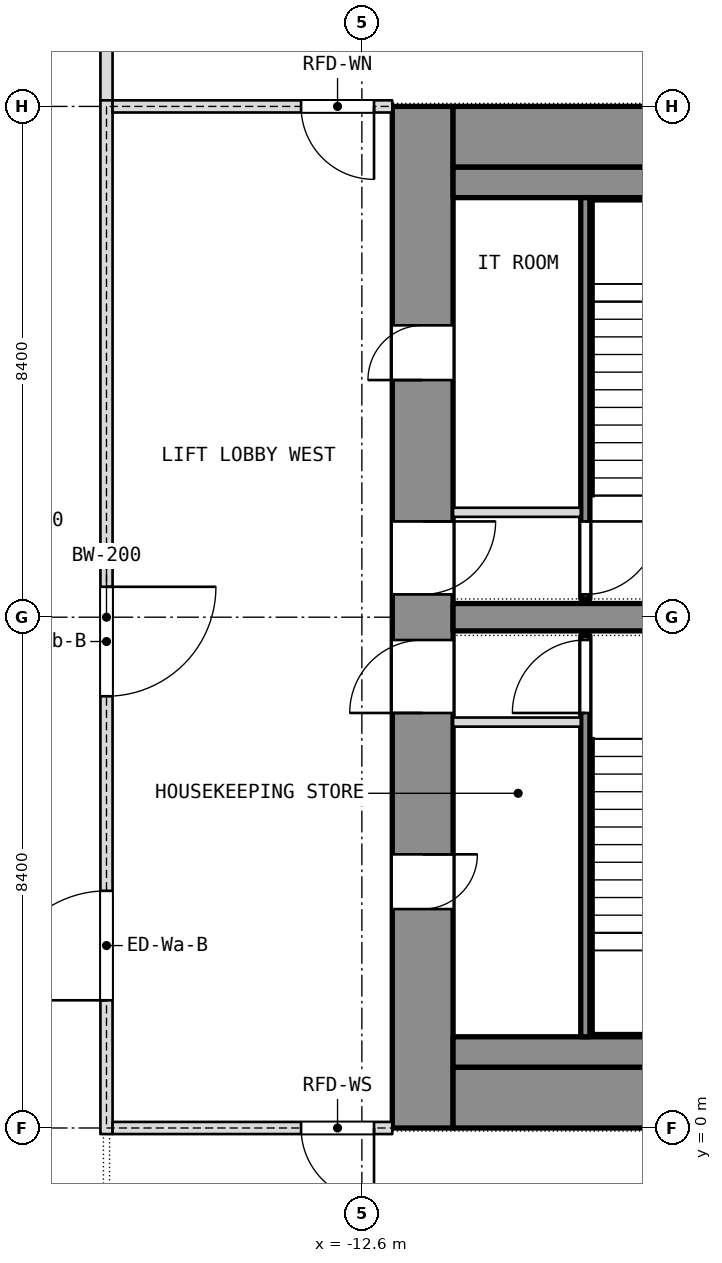
"""IFC4 building model, lengths in metres.
Left out: names, types, materials, properties, quantities, classifications, styles, units other than length and angle.
Written with IfcOpenShell. Run it as: python <this file> out.ifc"""

import sys

from ifc_helpers import new_model, si_unit, direction, frame, frame_2d, origin, place, context, subcontext, project, spatial, rectangle, extrude, element, fill, save


model = new_model("IFC4")
c1 = context("Model", 3, precision=1e-05, world=origin(), true_north=direction((0.0, 1.0)))
c2 = subcontext(c1, "Body", "Model", "MODEL_VIEW")
j1 = project(units=[si_unit("LENGTHUNIT", "METRE"), si_unit("PLANEANGLEUNIT", "RADIAN")], contexts=[c1])
p1 = place(None, origin())
s1 = spatial("IfcSite", under=j1, at=p1, CompositionType="ELEMENT")
p2 = place(p1, origin())
s2 = spatial("IfcBuilding", under=s1, at=p2, CompositionType="ELEMENT")
p3 = place(p2, frame((0.0, 0.0, 133.7)))
s3 = spatial("IfcBuildingStorey", under=s2, at=p3, CompositionType="ELEMENT", Elevation=133.7)
p4 = place(p3, frame((-11.6, 0.0, 0.0), z_axis=(0.0, 0.0, 1.0), x_axis=(0.0, 1.0, 0.0)))
e1 = element("IfcWall", 1, at=p4, inside=s3, PredefinedType="SHEAR", context=c2, shape_type="SweptSolid", body=[
    extrude(rectangle(XDim=16.8, YDim=1.0, at=frame_2d((8.4, 0.0))), origin(), (0.0, 0.0, 1.0), 3.6),
])
p5 = place(p4, frame((3.6, 0.0, 0.0)))
e2 = element("IfcOpeningElement", 2, at=p5, cuts=e1, PredefinedType="OPENING", context=c2, shape_type="SweptSolid", body=[
    extrude(rectangle(XDim=0.9, YDim=2.1, at=frame_2d((0.45, 1.05))), frame((0.0, 0.5, 0.0), z_axis=(0.0, -1.0, 0.0), x_axis=(1.0, 0.0, 0.0)), (0.0, 0.0, 1.0), 1.0),
])
p6 = place(p4, frame((6.825, 0.0, 0.0)))
e3 = element("IfcOpeningElement", 3, at=p6, cuts=e1, PredefinedType="OPENING", context=c2, shape_type="SweptSolid", body=[
    extrude(rectangle(XDim=1.2, YDim=2.1, at=frame_2d((0.6, 1.05))), frame((0.0, 0.5, 0.0), z_axis=(0.0, -1.0, 0.0), x_axis=(1.0, 0.0, 0.0)), (0.0, 0.0, 1.0), 1.0),
])
p7 = place(p4, frame((12.3, 0.0, 0.0)))
e4 = element("IfcOpeningElement", 4, at=p7, cuts=e1, PredefinedType="OPENING", context=c2, shape_type="SweptSolid", body=[
    extrude(rectangle(XDim=0.9, YDim=2.1, at=frame_2d((0.45, 1.05))), frame((0.0, 0.5, 0.0), z_axis=(0.0, -1.0, 0.0), x_axis=(1.0, 0.0, 0.0)), (0.0, 0.0, 1.0), 1.0),
])
p8 = place(p4, frame((8.775, 0.0, 0.0)))
e5 = element("IfcOpeningElement", 5, at=p8, cuts=e1, PredefinedType="OPENING", context=c2, shape_type="SweptSolid", body=[
    extrude(rectangle(XDim=1.2, YDim=2.1, at=frame_2d((0.6, 1.05))), frame((0.0, 0.5, 0.0), z_axis=(0.0, -1.0, 0.0), x_axis=(1.0, 0.0, 0.0)), (0.0, 0.0, 1.0), 1.0),
])
p9 = place(p3, frame((-11.1, 0.5, 0.0), z_axis=(0.0, 0.0, 1.0), x_axis=(1.0, 0.0, 0.0)))
e6 = element("IfcWall", 6, at=p9, inside=s3, PredefinedType="SHEAR", context=c2, shape_type="SweptSolid", body=[
    extrude(rectangle(XDim=22.2, YDim=1.0, at=frame_2d((11.1, 0.0))), origin(), (0.0, 0.0, 1.0), 3.6),
])
p10 = place(p9, frame((10.85, 0.0, 0.0)))
e7 = element("IfcOpeningElement", 7, at=p10, cuts=e6, PredefinedType="OPENING", context=c2, shape_type="SweptSolid", body=[
    extrude(rectangle(XDim=1.4, YDim=2.1, at=frame_2d((0.7, 1.05))), frame((0.0, 0.5, 0.0), z_axis=(0.0, -1.0, 0.0), x_axis=(1.0, 0.0, 0.0)), (0.0, 0.0, 1.0), 1.0),
])
p11 = place(p3, frame((-11.1, 16.3, 0.0), z_axis=(0.0, 0.0, 1.0), x_axis=(1.0, 0.0, 0.0)))
e8 = element("IfcWall", 8, at=p11, inside=s3, PredefinedType="SHEAR", context=c2, shape_type="SweptSolid", body=[
    extrude(rectangle(XDim=22.2, YDim=1.0, at=frame_2d((11.1, 0.0))), origin(), (0.0, 0.0, 1.0), 3.6),
])
p12 = place(p11, frame((10.4, 0.0, 0.0)))
e9 = element("IfcOpeningElement", 9, at=p12, cuts=e8, PredefinedType="OPENING", context=c2, shape_type="SweptSolid", body=[
    extrude(rectangle(XDim=1.4, YDim=2.1, at=frame_2d((0.7, 1.05))), frame((0.0, 0.5, 0.0), z_axis=(0.0, -1.0, 0.0), x_axis=(1.0, 0.0, 0.0)), (0.0, 0.0, 1.0), 1.0),
])
p13 = place(p3, frame((-11.1, 8.4, 0.0), z_axis=(0.0, 0.0, 1.0), x_axis=(1.0, 0.0, 0.0)))
e10 = element("IfcWall", 10, at=p13, inside=s3, PredefinedType="SHEAR", context=c2, shape_type="SweptSolid", body=[
    extrude(rectangle(XDim=6.675, YDim=0.45, at=frame_2d((3.337, 0.0))), origin(), (0.0, 0.0, 1.0), 3.6),
])
p14 = place(p3, frame((-16.8, 16.9, 0.0), z_axis=(0.0, 0.0, 1.0), x_axis=(0.0, 1.0, 0.0)))
e11 = element("IfcWall", 11, at=p14, inside=s3, PredefinedType="PARTITIONING", context=c2, shape_type="SweptSolid", body=[
    extrude(rectangle(XDim=1.4, YDim=0.2, at=frame_2d((0.7, 0.0))), origin(), (0.0, 0.0, 1.0), 3.34),
])
p15 = place(p3, frame((-11.1, 1.25, 0.0), z_axis=(0.0, 0.0, 1.0), x_axis=(1.0, 0.0, 0.0)))
e12 = element("IfcWall", 12, at=p15, inside=s3, PredefinedType="PARTITIONING", context=c2, shape_type="SweptSolid", body=[
    extrude(rectangle(XDim=10.85, YDim=0.5, at=frame_2d((5.425, 0.0))), origin(), (0.0, 0.0, 1.0), 3.34),
])
p16 = place(p3, frame((-11.1, 15.55, 0.0), z_axis=(0.0, 0.0, 1.0), x_axis=(1.0, 0.0, 0.0)))
e13 = element("IfcWall", 13, at=p16, inside=s3, PredefinedType="PARTITIONING", context=c2, shape_type="SweptSolid", body=[
    extrude(rectangle(XDim=10.2, YDim=0.5, at=frame_2d((5.1, 0.0))), origin(), (0.0, 0.0, 1.0), 3.34),
])
p17 = place(p3, frame((-8.925, 1.5, 0.0), z_axis=(0.0, 0.0, 1.0), x_axis=(0.0, 1.0, 0.0)))
e14 = element("IfcWall", 14, at=p17, inside=s3, PredefinedType="SHEAR", context=c2, shape_type="SweptSolid", body=[
    extrude(rectangle(XDim=6.6, YDim=0.15, at=frame_2d((3.3, 0.0))), origin(), (0.0, 0.0, 1.0), 3.34),
])
p18 = place(p17, frame((5.325, 0.0, 0.0)))
e15 = element("IfcOpeningElement", 15, at=p18, cuts=e14, PredefinedType="OPENING", context=c2, shape_type="SweptSolid", body=[
    extrude(rectangle(XDim=1.2, YDim=2.1, at=frame_2d((0.6, 1.05))), frame((0.0, 0.075, 0.0), z_axis=(0.0, -1.0, 0.0), x_axis=(1.0, 0.0, 0.0)), (0.0, 0.0, 1.0), 0.15),
])
p19 = place(p3, frame((-11.1, 6.675, 0.0), z_axis=(0.0, 0.0, 1.0), x_axis=(1.0, 0.0, 0.0)))
e16 = element("IfcWall", 16, at=p19, inside=s3, PredefinedType="PARTITIONING", context=c2, shape_type="SweptSolid", body=[
    extrude(rectangle(XDim=2.1, YDim=0.15, at=frame_2d((1.05, 0.0))), origin(), (0.0, 0.0, 1.0), 3.34),
])
p20 = place(p3, frame((-8.925, 8.7, 0.0), z_axis=(0.0, 0.0, 1.0), x_axis=(0.0, 1.0, 0.0)))
e17 = element("IfcWall", 17, at=p20, inside=s3, PredefinedType="SHEAR", context=c2, shape_type="SweptSolid", body=[
    extrude(rectangle(XDim=6.6, YDim=0.15, at=frame_2d((3.3, 0.0))), origin(), (0.0, 0.0, 1.0), 3.34),
])
p21 = place(p20, frame((0.075, 0.0, 0.0)))
e18 = element("IfcOpeningElement", 18, at=p21, cuts=e17, PredefinedType="OPENING", context=c2, shape_type="SweptSolid", body=[
    extrude(rectangle(XDim=1.2, YDim=2.1, at=frame_2d((0.6, 1.05))), frame((0.0, 0.075, 0.0), z_axis=(0.0, -1.0, 0.0), x_axis=(1.0, 0.0, 0.0)), (0.0, 0.0, 1.0), 0.15),
])
p22 = place(p3, frame((-11.1, 10.125, 0.0), z_axis=(0.0, 0.0, 1.0), x_axis=(1.0, 0.0, 0.0)))
e19 = element("IfcWall", 19, at=p22, inside=s3, PredefinedType="PARTITIONING", context=c2, shape_type="SweptSolid", body=[
    extrude(rectangle(XDim=2.1, YDim=0.15, at=frame_2d((1.05, 0.0))), origin(), (0.0, 0.0, 1.0), 3.34),
])
p23 = place(p3, frame((-16.8, -0.1, 0.0), z_axis=(0.0, 0.0, 1.0), x_axis=(0.0, 1.0, 0.0)))
e20 = element("IfcWall", 20, at=p23, inside=s3, PredefinedType="PARTITIONING", context=c2, shape_type="SweptSolid", body=[
    extrude(rectangle(XDim=17.0, YDim=0.2, at=frame_2d((8.5, 0.0))), origin(), (0.0, 0.0, 1.0), 3.34),
])
p24 = place(p23, frame((2.2, 0.0, 0.0)))
e21 = element("IfcOpeningElement", 21, at=p24, cuts=e20, PredefinedType="OPENING", context=c2, shape_type="SweptSolid", body=[
    extrude(rectangle(XDim=1.8, YDim=2.1, at=frame_2d((0.9, 1.05))), frame((0.0, 0.1, 0.0), z_axis=(0.0, -1.0, 0.0), x_axis=(1.0, 0.0, 0.0)), (0.0, 0.0, 1.0), 0.2),
])
p25 = place(p23, frame((7.2, 0.0, 0.0)))
e22 = element("IfcOpeningElement", 22, at=p25, cuts=e20, PredefinedType="OPENING", context=c2, shape_type="SweptSolid", body=[
    extrude(rectangle(XDim=1.8, YDim=2.1, at=frame_2d((0.9, 1.05))), frame((0.0, 0.1, 0.0), z_axis=(0.0, -1.0, 0.0), x_axis=(1.0, 0.0, 0.0)), (0.0, 0.0, 1.0), 0.2),
])
p26 = place(p3, frame((-16.7, 0.0, 0.0), z_axis=(0.0, 0.0, 1.0), x_axis=(1.0, 0.0, 0.0)))
e23 = element("IfcWall", 23, at=p26, inside=s3, PredefinedType="PARTITIONING", context=c2, shape_type="SweptSolid", body=[
    extrude(rectangle(XDim=4.6, YDim=0.2, at=frame_2d((2.3, 0.0))), origin(), (0.0, 0.0, 1.0), 2.89),
])
p27 = place(p26, frame((3.1, 0.0, 0.0)))
e24 = element("IfcOpeningElement", 24, at=p27, cuts=e23, PredefinedType="OPENING", context=c2, shape_type="SweptSolid", body=[
    extrude(rectangle(XDim=1.2, YDim=2.1, at=frame_2d((0.6, 1.05))), frame((0.0, 0.1, 0.0), z_axis=(0.0, -1.0, 0.0), x_axis=(1.0, 0.0, 0.0)), (0.0, 0.0, 1.0), 0.2),
])
p28 = place(p3, frame((-16.7, 16.8, 0.0), z_axis=(0.0, 0.0, 1.0), x_axis=(1.0, 0.0, 0.0)))
e25 = element("IfcWall", 25, at=p28, inside=s3, PredefinedType="PARTITIONING", context=c2, shape_type="SweptSolid", body=[
    extrude(rectangle(XDim=4.6, YDim=0.2, at=frame_2d((2.3, 0.0))), origin(), (0.0, 0.0, 1.0), 2.89),
])
p29 = place(p28, frame((3.1, 0.0, 0.0)))
e26 = element("IfcOpeningElement", 26, at=p29, cuts=e25, PredefinedType="OPENING", context=c2, shape_type="SweptSolid", body=[
    extrude(rectangle(XDim=1.2, YDim=2.1, at=frame_2d((0.6, 1.05))), frame((0.0, 0.1, 0.0), z_axis=(0.0, -1.0, 0.0), x_axis=(1.0, 0.0, 0.0)), (0.0, 0.0, 1.0), 0.2),
])
p30 = place(p5, origin())
e27 = element("IfcDoor", 27, at=p30, inside=s3, OperationType="SINGLE_SWING_LEFT", PredefinedType="DOOR", context=c2, shape_type="SweptSolid", body=[
    extrude(rectangle(XDim=0.9, YDim=2.1, at=frame_2d((0.45, 1.05))), frame((0.0, 0.025, 0.0), z_axis=(0.0, -1.0, 0.0), x_axis=(1.0, 0.0, 0.0)), (0.0, 0.0, 1.0), 0.05),
])
fill(e2, e27)
p31 = place(p6, origin())
e28 = element("IfcDoor", 28, at=p31, inside=s3, OperationType="SINGLE_SWING_LEFT", PredefinedType="DOOR", context=c2, shape_type="SweptSolid", body=[
    extrude(rectangle(XDim=1.2, YDim=2.1, at=frame_2d((0.6, 1.05))), frame((0.0, 0.025, 0.0), z_axis=(0.0, -1.0, 0.0), x_axis=(1.0, 0.0, 0.0)), (0.0, 0.0, 1.0), 0.05),
])
fill(e3, e28)
p32 = place(p18, origin())
e29 = element("IfcDoor", 29, at=p32, inside=s3, OperationType="SINGLE_SWING_LEFT", PredefinedType="DOOR", context=c2, shape_type="SweptSolid", body=[
    extrude(rectangle(XDim=1.2, YDim=2.1, at=frame_2d((0.6, 1.05))), frame((0.0, 0.025, 0.0), z_axis=(0.0, -1.0, 0.0), x_axis=(1.0, 0.0, 0.0)), (0.0, 0.0, 1.0), 0.05),
])
fill(e15, e29)
p33 = place(p7, origin())
e30 = element("IfcDoor", 30, at=p33, inside=s3, OperationType="SINGLE_SWING_LEFT", PredefinedType="DOOR", context=c2, shape_type="SweptSolid", body=[
    extrude(rectangle(XDim=0.9, YDim=2.1, at=frame_2d((0.45, 1.05))), frame((0.0, 0.025, 0.0), z_axis=(0.0, -1.0, 0.0), x_axis=(1.0, 0.0, 0.0)), (0.0, 0.0, 1.0), 0.05),
])
fill(e4, e30)
p34 = place(p8, origin())
e31 = element("IfcDoor", 31, at=p34, inside=s3, OperationType="SINGLE_SWING_LEFT", PredefinedType="DOOR", context=c2, shape_type="SweptSolid", body=[
    extrude(rectangle(XDim=1.2, YDim=2.1, at=frame_2d((0.6, 1.05))), frame((0.0, 0.025, 0.0), z_axis=(0.0, -1.0, 0.0), x_axis=(1.0, 0.0, 0.0)), (0.0, 0.0, 1.0), 0.05),
])
fill(e5, e31)
p35 = place(p21, origin())
e32 = element("IfcDoor", 32, at=p35, inside=s3, OperationType="SINGLE_SWING_LEFT", PredefinedType="DOOR", context=c2, shape_type="SweptSolid", body=[
    extrude(rectangle(XDim=1.2, YDim=2.1, at=frame_2d((0.6, 1.05))), frame((0.0, 0.025, 0.0), z_axis=(0.0, -1.0, 0.0), x_axis=(1.0, 0.0, 0.0)), (0.0, 0.0, 1.0), 0.05),
])
fill(e18, e32)
p36 = place(p24, origin())
e33 = element("IfcDoor", 33, at=p36, inside=s3, OperationType="DOUBLE_DOOR_SINGLE_SWING", PredefinedType="DOOR", context=c2, shape_type="SweptSolid", body=[
    extrude(rectangle(XDim=1.8, YDim=2.1, at=frame_2d((0.9, 1.05))), frame((0.0, 0.025, 0.0), z_axis=(0.0, -1.0, 0.0), x_axis=(1.0, 0.0, 0.0)), (0.0, 0.0, 1.0), 0.05),
])
fill(e21, e33)
p37 = place(p25, origin())
e34 = element("IfcDoor", 34, at=p37, inside=s3, OperationType="DOUBLE_DOOR_SINGLE_SWING", PredefinedType="DOOR", context=c2, shape_type="SweptSolid", body=[
    extrude(rectangle(XDim=1.8, YDim=2.1, at=frame_2d((0.9, 1.05))), frame((0.0, 0.025, 0.0), z_axis=(0.0, -1.0, 0.0), x_axis=(1.0, 0.0, 0.0)), (0.0, 0.0, 1.0), 0.05),
])
fill(e22, e34)
p38 = place(p27, origin())
e35 = element("IfcDoor", 35, at=p38, inside=s3, OperationType="SINGLE_SWING_LEFT", PredefinedType="DOOR", context=c2, shape_type="SweptSolid", body=[
    extrude(rectangle(XDim=1.2, YDim=2.1, at=frame_2d((0.6, 1.05))), frame((0.0, 0.025, 0.0), z_axis=(0.0, -1.0, 0.0), x_axis=(1.0, 0.0, 0.0)), (0.0, 0.0, 1.0), 0.05),
])
fill(e24, e35)
p39 = place(p29, origin())
e36 = element("IfcDoor", 36, at=p39, inside=s3, OperationType="SINGLE_SWING_LEFT", PredefinedType="DOOR", context=c2, shape_type="SweptSolid", body=[
    extrude(rectangle(XDim=1.2, YDim=2.1, at=frame_2d((0.6, 1.05))), frame((0.0, 0.025, 0.0), z_axis=(0.0, -1.0, 0.0), x_axis=(1.0, 0.0, 0.0)), (0.0, 0.0, 1.0), 0.05),
])
fill(e26, e36)
save(model, sys.argv[1])
